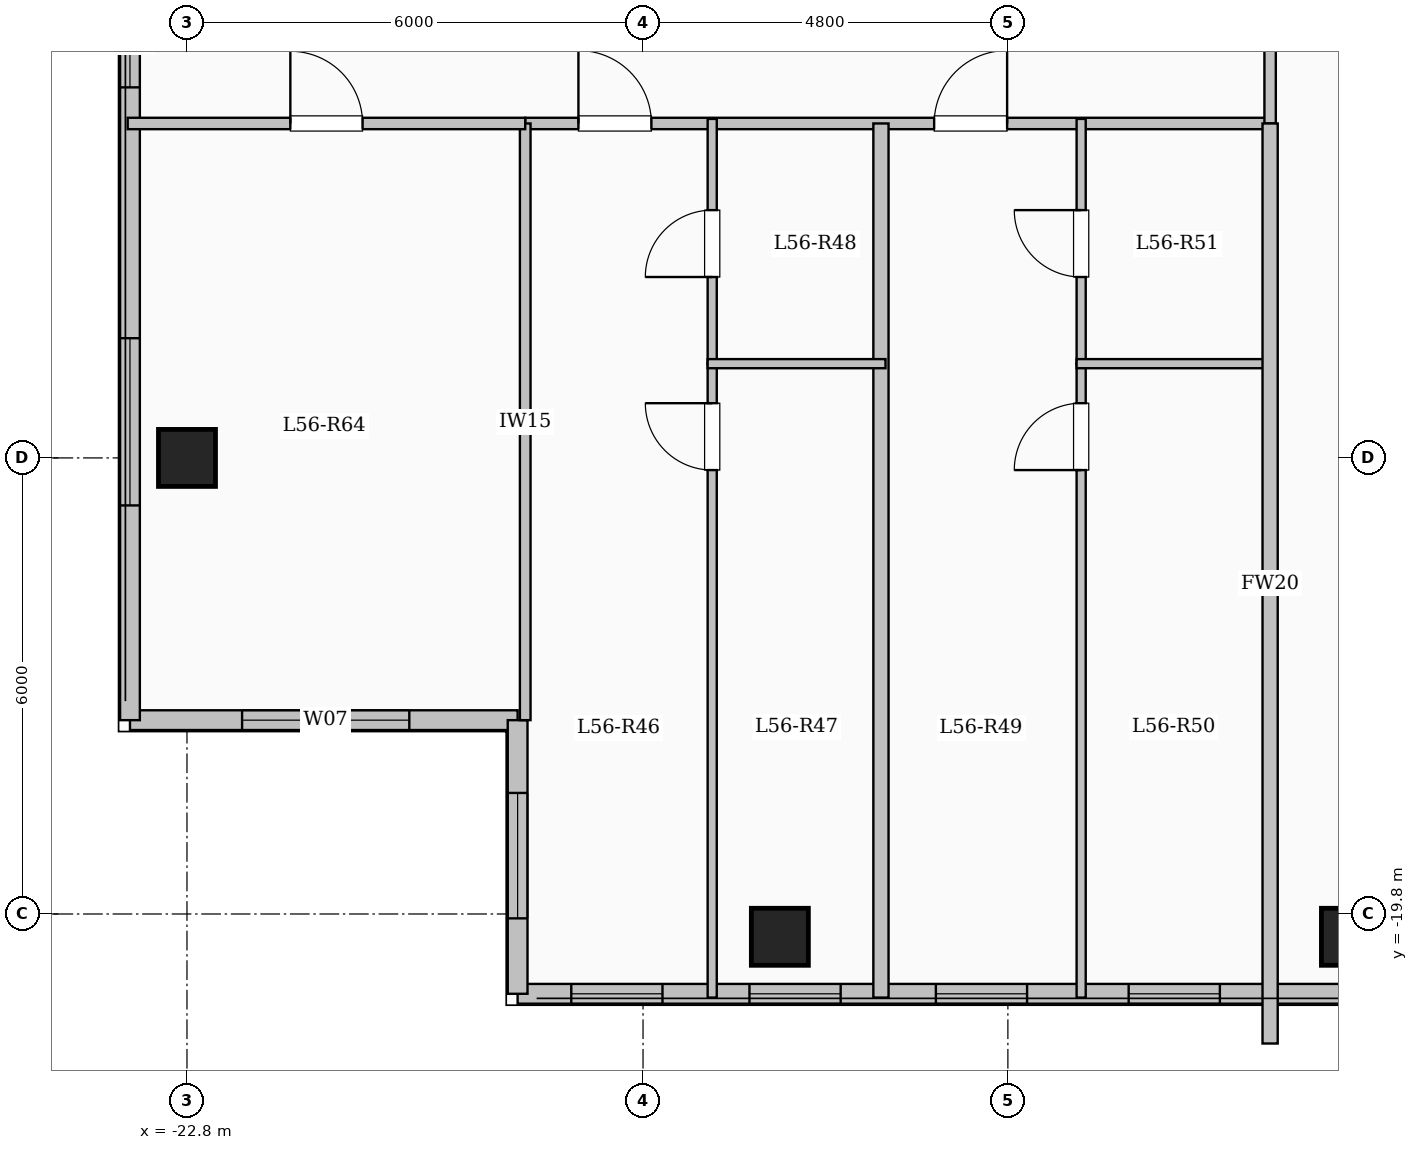
"""IFC4 building model, lengths in metres.
Left out: names, types, materials, properties, quantities, classifications, styles, units other than length and angle.
Written with IfcOpenShell. Run it as: python <this file> out.ifc"""

import sys

from ifc_helpers import new_model, si_unit, direction, frame, frame_2d, origin, origin_2d, place, context, subcontext, project, spatial, rectangle, extrude, element, fill, save


model = new_model("IFC4")
c1 = context("Model", 3, precision=1e-05, world=origin(), true_north=direction((0.0, 1.0)))
c2 = subcontext(c1, "Body", "Model", "MODEL_VIEW")
j1 = project(units=[si_unit("LENGTHUNIT", "METRE"), si_unit("PLANEANGLEUNIT", "RADIAN")], contexts=[c1])
p1 = place(None, origin())
s1 = spatial("IfcSite", under=j1, at=p1, CompositionType="ELEMENT")
p2 = place(p1, origin())
s2 = spatial("IfcBuilding", under=s1, at=p2, CompositionType="ELEMENT")
p3 = place(p2, frame((0.0, 0.0, 207.0)))
s3 = spatial("IfcBuildingStorey", under=s2, at=p3, CompositionType="ELEMENT", Elevation=207.0)
for number, where, z_axis, x_axis in (
    (1, (-15.0, -20.1, 0.0), (0.0, 0.0, 1.0), (1.0, 0.0, 0.0)),
    (2, (-7.5, -20.1, 0.0), (0.0, 0.0, 1.0), (1.0, 0.0, 0.0)),
    (3, (-22.8, -13.8, 0.0), (0.0, 0.0, 1.0), (1.0, 0.0, 0.0)),
):
    element("IfcColumn", number, at=place(p3, frame(where, z_axis=z_axis, x_axis=x_axis)), inside=s3, PredefinedType="COLUMN", context=c2, shape_type="SweptSolid", body=[
        extrude(rectangle(XDim=0.75, YDim=0.75, at=origin_2d()), origin(), (0.0, 0.0, 1.0), 3.35),
    ])
p4 = place(p3, frame((-18.45, -17.25, 0.0), z_axis=(0.0, 0.0, 1.0), x_axis=(-1.0, 0.0, 0.0)))
e4 = element("IfcWall", 4, at=p4, inside=s3, PredefinedType="SOLIDWALL", context=c2, shape_type="SweptSolid", body=[
    extrude(rectangle(XDim=5.1, YDim=0.26, at=frame_2d((2.55, 0.0))), origin(), (0.0, 0.0, 1.0), 3.1),
])
p5 = place(p4, frame((1.425, 0.0, 0.9)))
e5 = element("IfcOpeningElement", 5, at=p5, cuts=e4, PredefinedType="OPENING", context=c2, shape_type="SweptSolid", body=[
    extrude(rectangle(XDim=2.2, YDim=1.75, at=frame_2d((1.1, 0.875))), frame((0.0, 0.14, 0.0), z_axis=(0.0, -1.0, 0.0), x_axis=(1.0, 0.0, 0.0)), (0.0, 0.0, 1.0), 0.28),
])
p6 = place(p3, frame((-23.55, -17.25, 0.0), z_axis=(0.0, 0.0, 1.0), x_axis=(0.0, 1.0, 0.0)))
e6 = element("IfcWall", 6, at=p6, inside=s3, PredefinedType="SOLIDWALL", context=c2, shape_type="SweptSolid", body=[
    extrude(rectangle(XDim=34.5, YDim=0.26, at=frame_2d((17.25, 0.0))), origin(), (0.0, 0.0, 1.0), 3.1),
])
p7 = place(p6, frame((2.825, 0.0, 0.9)))
e7 = element("IfcOpeningElement", 7, at=p7, cuts=e6, PredefinedType="OPENING", context=c2, shape_type="SweptSolid", body=[
    extrude(rectangle(XDim=2.2, YDim=1.75, at=frame_2d((1.1, 0.875))), frame((0.0, 0.14, 0.0), z_axis=(0.0, -1.0, 0.0), x_axis=(1.0, 0.0, 0.0)), (0.0, 0.0, 1.0), 0.28),
])
p8 = place(p6, frame((8.325, 0.0, 0.95)))
e8 = element("IfcOpeningElement", 8, at=p8, cuts=e6, PredefinedType="OPENING", context=c2, shape_type="SweptSolid", body=[
    extrude(rectangle(XDim=1.2, YDim=1.5, at=frame_2d((0.6, 0.75))), frame((0.0, 0.14, 0.0), z_axis=(0.0, -1.0, 0.0), x_axis=(1.0, 0.0, 0.0)), (0.0, 0.0, 1.0), 0.28),
])
p9 = place(p6, frame((13.25, 0.0, 0.9)))
e9 = element("IfcOpeningElement", 9, at=p9, cuts=e6, PredefinedType="OPENING", context=c2, shape_type="SweptSolid", body=[
    extrude(rectangle(XDim=2.2, YDim=1.75, at=frame_2d((1.1, 0.875))), frame((0.0, 0.14, 0.0), z_axis=(0.0, -1.0, 0.0), x_axis=(1.0, 0.0, 0.0)), (0.0, 0.0, 1.0), 0.28),
])
p10 = place(p6, frame((19.65, 0.0, 0.9)))
e10 = element("IfcOpeningElement", 10, at=p10, cuts=e6, PredefinedType="OPENING", context=c2, shape_type="SweptSolid", body=[
    extrude(rectangle(XDim=1.65, YDim=1.6, at=frame_2d((0.825, 0.8))), frame((0.0, 0.14, 0.0), z_axis=(0.0, -1.0, 0.0), x_axis=(1.0, 0.0, 0.0)), (0.0, 0.0, 1.0), 0.28),
])
p11 = place(p6, frame((24.125, 0.0, 0.9)))
e11 = element("IfcOpeningElement", 11, at=p11, cuts=e6, PredefinedType="OPENING", context=c2, shape_type="SweptSolid", body=[
    extrude(rectangle(XDim=2.0, YDim=1.7, at=frame_2d((1.0, 0.85))), frame((0.0, 0.14, 0.0), z_axis=(0.0, -1.0, 0.0), x_axis=(1.0, 0.0, 0.0)), (0.0, 0.0, 1.0), 0.28),
])
p12 = place(p6, frame((28.375, 0.0, 0.95)))
e12 = element("IfcOpeningElement", 12, at=p12, cuts=e6, PredefinedType="OPENING", context=c2, shape_type="SweptSolid", body=[
    extrude(rectangle(XDim=1.0, YDim=1.5, at=frame_2d((0.5, 0.75))), frame((0.0, 0.14, 0.0), z_axis=(0.0, -1.0, 0.0), x_axis=(1.0, 0.0, 0.0)), (0.0, 0.0, 1.0), 0.28),
])
p13 = place(p6, frame((31.125, 0.0, 0.9)))
e13 = element("IfcOpeningElement", 13, at=p13, cuts=e6, PredefinedType="OPENING", context=c2, shape_type="SweptSolid", body=[
    extrude(rectangle(XDim=2.0, YDim=1.7, at=frame_2d((1.0, 0.85))), frame((0.0, 0.14, 0.0), z_axis=(0.0, -1.0, 0.0), x_axis=(1.0, 0.0, 0.0)), (0.0, 0.0, 1.0), 0.28),
])
p14 = place(p3, frame((-7.35, -20.85, 0.0), z_axis=(0.0, 0.0, 1.0), x_axis=(-1.0, 0.0, 0.0)))
e14 = element("IfcWall", 14, at=p14, inside=s3, PredefinedType="SOLIDWALL", context=c2, shape_type="SweptSolid", body=[
    extrude(rectangle(XDim=11.1, YDim=0.26, at=frame_2d((5.55, 0.0))), origin(), (0.0, 0.0, 1.0), 3.1),
])
p15 = place(p14, frame((1.861, 0.0, 0.95)))
e15 = element("IfcOpeningElement", 15, at=p15, cuts=e14, PredefinedType="OPENING", context=c2, shape_type="SweptSolid", body=[
    extrude(rectangle(XDim=1.2, YDim=1.5, at=frame_2d((0.6, 0.75))), frame((0.0, 0.14, 0.0), z_axis=(0.0, -1.0, 0.0), x_axis=(1.0, 0.0, 0.0)), (0.0, 0.0, 1.0), 0.28),
])
p16 = place(p14, frame((4.397, 0.0, 0.95)))
e16 = element("IfcOpeningElement", 16, at=p16, cuts=e14, PredefinedType="OPENING", context=c2, shape_type="SweptSolid", body=[
    extrude(rectangle(XDim=1.2, YDim=1.5, at=frame_2d((0.6, 0.75))), frame((0.0, 0.14, 0.0), z_axis=(0.0, -1.0, 0.0), x_axis=(1.0, 0.0, 0.0)), (0.0, 0.0, 1.0), 0.28),
])
p17 = place(p14, frame((6.85, 0.0, 0.95)))
e17 = element("IfcOpeningElement", 17, at=p17, cuts=e14, PredefinedType="OPENING", context=c2, shape_type="SweptSolid", body=[
    extrude(rectangle(XDim=1.2, YDim=1.5, at=frame_2d((0.6, 0.75))), frame((0.0, 0.14, 0.0), z_axis=(0.0, -1.0, 0.0), x_axis=(1.0, 0.0, 0.0)), (0.0, 0.0, 1.0), 0.28),
])
p18 = place(p14, frame((9.194, 0.0, 0.95)))
e18 = element("IfcOpeningElement", 18, at=p18, cuts=e14, PredefinedType="OPENING", context=c2, shape_type="SweptSolid", body=[
    extrude(rectangle(XDim=1.2, YDim=1.5, at=frame_2d((0.6, 0.75))), frame((0.0, 0.14, 0.0), z_axis=(0.0, -1.0, 0.0), x_axis=(1.0, 0.0, 0.0)), (0.0, 0.0, 1.0), 0.28),
])
p19 = place(p3, frame((-18.45, -20.85, 0.0), z_axis=(0.0, 0.0, 1.0), x_axis=(0.0, 1.0, 0.0)))
e19 = element("IfcWall", 19, at=p19, inside=s3, PredefinedType="SOLIDWALL", context=c2, shape_type="SweptSolid", body=[
    extrude(rectangle(XDim=3.6, YDim=0.26, at=frame_2d((1.8, 0.0))), origin(), (0.0, 0.0, 1.0), 3.1),
])
p20 = place(p19, frame((0.992, 0.0, 0.9)))
e20 = element("IfcOpeningElement", 20, at=p20, cuts=e19, PredefinedType="OPENING", context=c2, shape_type="SweptSolid", body=[
    extrude(rectangle(XDim=1.65, YDim=1.6, at=frame_2d((0.825, 0.8))), frame((0.0, 0.14, 0.0), z_axis=(0.0, -1.0, 0.0), x_axis=(1.0, 0.0, 0.0)), (0.0, 0.0, 1.0), 0.28),
])
p21 = place(p3, frame((-18.35, -9.4, 0.0), z_axis=(0.0, 0.0, 1.0), x_axis=(1.0, 0.0, 0.0)))
e21 = element("IfcWall", 21, at=p21, inside=s3, PredefinedType="PARTITIONING", context=c2, shape_type="SweptSolid", body=[
    extrude(rectangle(XDim=9.8, YDim=0.15, at=frame_2d((4.9, 0.0))), origin(), (0.0, 0.0, 1.0), 3.1),
])
p22 = place(p21, frame((0.7, 0.0, 0.0)))
e22 = element("IfcOpeningElement", 22, at=p22, cuts=e21, PredefinedType="OPENING", context=c2, shape_type="SweptSolid", body=[
    extrude(rectangle(XDim=0.96, YDim=2.15, at=frame_2d((0.48, 1.075))), frame((0.0, 0.085, 0.0), z_axis=(0.0, -1.0, 0.0), x_axis=(1.0, 0.0, 0.0)), (0.0, 0.0, 1.0), 0.17),
])
p23 = place(p21, frame((5.38, 0.0, 0.0)))
e23 = element("IfcOpeningElement", 23, at=p23, cuts=e21, PredefinedType="OPENING", context=c2, shape_type="SweptSolid", body=[
    extrude(rectangle(XDim=0.96, YDim=2.15, at=frame_2d((0.48, 1.075))), frame((0.0, 0.085, 0.0), z_axis=(0.0, -1.0, 0.0), x_axis=(1.0, 0.0, 0.0)), (0.0, 0.0, 1.0), 0.17),
])
p24 = place(p3, frame((-8.55, -9.4, 0.0), z_axis=(0.0, 0.0, 1.0), x_axis=(0.0, 1.0, 0.0)))
e24 = element("IfcWall", 24, at=p24, inside=s3, PredefinedType="PARTITIONING", context=c2, shape_type="SweptSolid", body=[
    extrude(rectangle(XDim=2.15, YDim=0.15, at=frame_2d((1.075, 0.0))), origin(), (0.0, 0.0, 1.0), 3.1),
])
p25 = place(p3, frame((-13.67, -20.9, 0.0), z_axis=(0.0, 0.0, 1.0), x_axis=(0.0, 1.0, 0.0)))
e25 = element("IfcWall", 25, at=p25, inside=s3, PredefinedType="SOLIDWALL", context=c2, shape_type="SweptSolid", body=[
    extrude(rectangle(XDim=11.5, YDim=0.2, at=frame_2d((5.75, 0.0))), origin(), (0.0, 0.0, 1.0), 3.1),
])
p26 = place(p3, frame((-15.89, -20.9, 0.0), z_axis=(0.0, 0.0, 1.0), x_axis=(0.0, 1.0, 0.0)))
e26 = element("IfcWall", 26, at=p26, inside=s3, PredefinedType="PARTITIONING", context=c2, shape_type="SweptSolid", body=[
    extrude(rectangle(XDim=8.34, YDim=0.12, at=frame_2d((4.17, 0.0))), origin(), (0.0, 0.0, 1.0), 3.1),
])
p27 = place(p26, frame((6.94, 0.0, 0.0)))
e27 = element("IfcOpeningElement", 27, at=p27, cuts=e26, PredefinedType="OPENING", context=c2, shape_type="SweptSolid", body=[
    extrude(rectangle(XDim=0.88, YDim=2.1, at=frame_2d((0.44, 1.05))), frame((0.0, 0.07, 0.0), z_axis=(0.0, -1.0, 0.0), x_axis=(1.0, 0.0, 0.0)), (0.0, 0.0, 1.0), 0.14),
])
p28 = place(p3, frame((-15.89, -12.56, 0.0), z_axis=(0.0, 0.0, 1.0), x_axis=(0.0, 1.0, 0.0)))
e28 = element("IfcWall", 28, at=p28, inside=s3, PredefinedType="PARTITIONING", context=c2, shape_type="SweptSolid", body=[
    extrude(rectangle(XDim=3.22, YDim=0.12, at=frame_2d((1.61, 0.0))), origin(), (0.0, 0.0, 1.0), 3.1),
])
p29 = place(p28, frame((1.14, 0.0, 0.0)))
e29 = element("IfcOpeningElement", 29, at=p29, cuts=e28, PredefinedType="OPENING", context=c2, shape_type="SweptSolid", body=[
    extrude(rectangle(XDim=0.88, YDim=2.1, at=frame_2d((0.44, 1.05))), frame((0.0, 0.07, 0.0), z_axis=(0.0, -1.0, 0.0), x_axis=(1.0, 0.0, 0.0)), (0.0, 0.0, 1.0), 0.14),
])
p30 = place(p3, frame((-15.95, -12.56, 0.0), z_axis=(0.0, 0.0, 1.0), x_axis=(1.0, 0.0, 0.0)))
e30 = element("IfcWall", 30, at=p30, inside=s3, PredefinedType="PARTITIONING", context=c2, shape_type="SweptSolid", body=[
    extrude(rectangle(XDim=2.34, YDim=0.12, at=frame_2d((1.17, 0.0))), origin(), (0.0, 0.0, 1.0), 2.725),
])
p31 = place(p3, frame((-11.036, -20.9, 0.0), z_axis=(0.0, 0.0, 1.0), x_axis=(0.0, 1.0, 0.0)))
e31 = element("IfcWall", 31, at=p31, inside=s3, PredefinedType="PARTITIONING", context=c2, shape_type="SweptSolid", body=[
    extrude(rectangle(XDim=8.34, YDim=0.12, at=frame_2d((4.17, 0.0))), origin(), (0.0, 0.0, 1.0), 3.1),
])
p32 = place(p31, frame((6.94, 0.0, 0.0)))
e32 = element("IfcOpeningElement", 32, at=p32, cuts=e31, PredefinedType="OPENING", context=c2, shape_type="SweptSolid", body=[
    extrude(rectangle(XDim=0.88, YDim=2.1, at=frame_2d((0.44, 1.05))), frame((0.0, 0.07, 0.0), z_axis=(0.0, -1.0, 0.0), x_axis=(1.0, 0.0, 0.0)), (0.0, 0.0, 1.0), 0.14),
])
p33 = place(p3, frame((-11.036, -12.56, 0.0), z_axis=(0.0, 0.0, 1.0), x_axis=(0.0, 1.0, 0.0)))
e33 = element("IfcWall", 33, at=p33, inside=s3, PredefinedType="PARTITIONING", context=c2, shape_type="SweptSolid", body=[
    extrude(rectangle(XDim=3.22, YDim=0.12, at=frame_2d((1.61, 0.0))), origin(), (0.0, 0.0, 1.0), 3.1),
])
p34 = place(p33, frame((1.14, 0.0, 0.0)))
e34 = element("IfcOpeningElement", 34, at=p34, cuts=e33, PredefinedType="OPENING", context=c2, shape_type="SweptSolid", body=[
    extrude(rectangle(XDim=0.88, YDim=2.1, at=frame_2d((0.44, 1.05))), frame((0.0, 0.07, 0.0), z_axis=(0.0, -1.0, 0.0), x_axis=(1.0, 0.0, 0.0)), (0.0, 0.0, 1.0), 0.14),
])
p35 = place(p3, frame((-11.096, -12.56, 0.0), z_axis=(0.0, 0.0, 1.0), x_axis=(1.0, 0.0, 0.0)))
e35 = element("IfcWall", 35, at=p35, inside=s3, PredefinedType="PARTITIONING", context=c2, shape_type="SweptSolid", body=[
    extrude(rectangle(XDim=2.556, YDim=0.12, at=frame_2d((1.278, 0.0))), origin(), (0.0, 0.0, 1.0), 2.725),
])
p36 = place(p3, frame((-8.55, -21.504, 0.0), z_axis=(0.0, 0.0, 1.0), x_axis=(0.0, 1.0, 0.0)))
e36 = element("IfcWall", 36, at=p36, inside=s3, PredefinedType="SOLIDWALL", context=c2, shape_type="SweptSolid", body=[
    extrude(rectangle(XDim=12.104, YDim=0.2, at=frame_2d((6.052, 0.0))), origin(), (0.0, 0.0, 1.0), 3.1),
])
p37 = place(p3, frame((-18.35, -17.25, 0.0), z_axis=(0.0, 0.0, 1.0), x_axis=(0.0, 1.0, 0.0)))
e37 = element("IfcWall", 37, at=p37, inside=s3, PredefinedType="PARTITIONING", context=c2, shape_type="SweptSolid", body=[
    extrude(rectangle(XDim=7.85, YDim=0.14, at=frame_2d((3.925, 0.0))), origin(), (0.0, 0.0, 1.0), 3.1),
])
p38 = place(p3, frame((-23.58, -9.4, 0.0), z_axis=(0.0, 0.0, 1.0), x_axis=(1.0, 0.0, 0.0)))
e38 = element("IfcWall", 38, at=p38, inside=s3, PredefinedType="PARTITIONING", context=c2, shape_type="SweptSolid", body=[
    extrude(rectangle(XDim=5.23, YDim=0.15, at=frame_2d((2.615, 0.0))), origin(), (0.0, 0.0, 1.0), 3.1),
])
p39 = place(p38, frame((2.14, 0.0, 0.0)))
e39 = element("IfcOpeningElement", 39, at=p39, cuts=e38, PredefinedType="OPENING", context=c2, shape_type="SweptSolid", body=[
    extrude(rectangle(XDim=0.95, YDim=2.15, at=frame_2d((0.475, 1.075))), frame((0.0, 0.085, 0.0), z_axis=(0.0, -1.0, 0.0), x_axis=(1.0, 0.0, 0.0)), (0.0, 0.0, 1.0), 0.17),
])
p40 = place(p5, origin())
e40 = element("IfcWindow", 40, at=p40, inside=s3, PartitioningType="SINGLE_PANEL", PredefinedType="WINDOW", context=c2, shape_type="SweptSolid", body=[
    extrude(rectangle(XDim=2.2, YDim=1.75, at=frame_2d((1.1, 0.875))), frame((0.0, 0.03, 0.0), z_axis=(0.0, -1.0, 0.0), x_axis=(1.0, 0.0, 0.0)), (0.0, 0.0, 1.0), 0.06),
])
fill(e5, e40)
p41 = place(p7, origin())
e41 = element("IfcWindow", 41, at=p41, inside=s3, PartitioningType="SINGLE_PANEL", PredefinedType="WINDOW", context=c2, shape_type="SweptSolid", body=[
    extrude(rectangle(XDim=2.2, YDim=1.75, at=frame_2d((1.1, 0.875))), frame((0.0, 0.03, 0.0), z_axis=(0.0, -1.0, 0.0), x_axis=(1.0, 0.0, 0.0)), (0.0, 0.0, 1.0), 0.06),
])
fill(e7, e41)
p42 = place(p8, origin())
e42 = element("IfcWindow", 42, at=p42, inside=s3, PartitioningType="SINGLE_PANEL", PredefinedType="WINDOW", context=c2, shape_type="SweptSolid", body=[
    extrude(rectangle(XDim=1.2, YDim=1.5, at=frame_2d((0.6, 0.75))), frame((0.0, 0.03, 0.0), z_axis=(0.0, -1.0, 0.0), x_axis=(1.0, 0.0, 0.0)), (0.0, 0.0, 1.0), 0.06),
])
fill(e8, e42)
p43 = place(p15, origin())
e43 = element("IfcWindow", 43, at=p43, inside=s3, PartitioningType="SINGLE_PANEL", PredefinedType="WINDOW", context=c2, shape_type="SweptSolid", body=[
    extrude(rectangle(XDim=1.2, YDim=1.5, at=frame_2d((0.6, 0.75))), frame((0.0, 0.03, 0.0), z_axis=(0.0, -1.0, 0.0), x_axis=(1.0, 0.0, 0.0)), (0.0, 0.0, 1.0), 0.06),
])
fill(e15, e43)
p44 = place(p16, origin())
e44 = element("IfcWindow", 44, at=p44, inside=s3, PartitioningType="SINGLE_PANEL", PredefinedType="WINDOW", context=c2, shape_type="SweptSolid", body=[
    extrude(rectangle(XDim=1.2, YDim=1.5, at=frame_2d((0.6, 0.75))), frame((0.0, 0.03, 0.0), z_axis=(0.0, -1.0, 0.0), x_axis=(1.0, 0.0, 0.0)), (0.0, 0.0, 1.0), 0.06),
])
fill(e16, e44)
p45 = place(p17, origin())
e45 = element("IfcWindow", 45, at=p45, inside=s3, PartitioningType="SINGLE_PANEL", PredefinedType="WINDOW", context=c2, shape_type="SweptSolid", body=[
    extrude(rectangle(XDim=1.2, YDim=1.5, at=frame_2d((0.6, 0.75))), frame((0.0, 0.03, 0.0), z_axis=(0.0, -1.0, 0.0), x_axis=(1.0, 0.0, 0.0)), (0.0, 0.0, 1.0), 0.06),
])
fill(e17, e45)
p46 = place(p18, origin())
e46 = element("IfcWindow", 46, at=p46, inside=s3, PartitioningType="SINGLE_PANEL", PredefinedType="WINDOW", context=c2, shape_type="SweptSolid", body=[
    extrude(rectangle(XDim=1.2, YDim=1.5, at=frame_2d((0.6, 0.75))), frame((0.0, 0.03, 0.0), z_axis=(0.0, -1.0, 0.0), x_axis=(1.0, 0.0, 0.0)), (0.0, 0.0, 1.0), 0.06),
])
fill(e18, e46)
p47 = place(p20, origin())
e47 = element("IfcWindow", 47, at=p47, inside=s3, PartitioningType="SINGLE_PANEL", PredefinedType="WINDOW", context=c2, shape_type="SweptSolid", body=[
    extrude(rectangle(XDim=1.65, YDim=1.6, at=frame_2d((0.825, 0.8))), frame((0.0, 0.03, 0.0), z_axis=(0.0, -1.0, 0.0), x_axis=(1.0, 0.0, 0.0)), (0.0, 0.0, 1.0), 0.06),
])
fill(e20, e47)
p48 = place(p22, origin())
e48 = element("IfcDoor", 48, at=p48, inside=s3, OperationType="SINGLE_SWING_LEFT", PredefinedType="DOOR", context=c2, shape_type="SweptSolid", body=[
    extrude(rectangle(XDim=0.96, YDim=2.15, at=frame_2d((0.48, 1.075))), frame((0.0, 0.025, 0.0), z_axis=(0.0, -1.0, 0.0), x_axis=(1.0, 0.0, 0.0)), (0.0, 0.0, 1.0), 0.05),
])
fill(e22, e48)
p49 = place(p27, origin())
e49 = element("IfcDoor", 49, at=p49, inside=s3, OperationType="SINGLE_SWING_RIGHT", PredefinedType="DOOR", context=c2, shape_type="SweptSolid", body=[
    extrude(rectangle(XDim=0.88, YDim=2.1, at=frame_2d((0.44, 1.05))), frame((0.0, 0.025, 0.0), z_axis=(0.0, -1.0, 0.0), x_axis=(1.0, 0.0, 0.0)), (0.0, 0.0, 1.0), 0.05),
])
fill(e27, e49)
p50 = place(p29, origin())
e50 = element("IfcDoor", 50, at=p50, inside=s3, OperationType="SINGLE_SWING_LEFT", PredefinedType="DOOR", context=c2, shape_type="SweptSolid", body=[
    extrude(rectangle(XDim=0.88, YDim=2.1, at=frame_2d((0.44, 1.05))), frame((0.0, 0.025, 0.0), z_axis=(0.0, -1.0, 0.0), x_axis=(1.0, 0.0, 0.0)), (0.0, 0.0, 1.0), 0.05),
])
fill(e29, e50)
p51 = place(p23, origin())
e51 = element("IfcDoor", 51, at=p51, inside=s3, OperationType="SINGLE_SWING_RIGHT", PredefinedType="DOOR", context=c2, shape_type="SweptSolid", body=[
    extrude(rectangle(XDim=0.96, YDim=2.15, at=frame_2d((0.48, 1.075))), frame((0.0, 0.025, 0.0), z_axis=(0.0, -1.0, 0.0), x_axis=(1.0, 0.0, 0.0)), (0.0, 0.0, 1.0), 0.05),
])
fill(e23, e51)
p52 = place(p32, origin())
e52 = element("IfcDoor", 52, at=p52, inside=s3, OperationType="SINGLE_SWING_LEFT", PredefinedType="DOOR", context=c2, shape_type="SweptSolid", body=[
    extrude(rectangle(XDim=0.88, YDim=2.1, at=frame_2d((0.44, 1.05))), frame((0.0, 0.025, 0.0), z_axis=(0.0, -1.0, 0.0), x_axis=(1.0, 0.0, 0.0)), (0.0, 0.0, 1.0), 0.05),
])
fill(e32, e52)
p53 = place(p34, origin())
e53 = element("IfcDoor", 53, at=p53, inside=s3, OperationType="SINGLE_SWING_RIGHT", PredefinedType="DOOR", context=c2, shape_type="SweptSolid", body=[
    extrude(rectangle(XDim=0.88, YDim=2.1, at=frame_2d((0.44, 1.05))), frame((0.0, 0.025, 0.0), z_axis=(0.0, -1.0, 0.0), x_axis=(1.0, 0.0, 0.0)), (0.0, 0.0, 1.0), 0.05),
])
fill(e34, e53)
p54 = place(p39, origin())
e54 = element("IfcDoor", 54, at=p54, inside=s3, OperationType="SINGLE_SWING_LEFT", PredefinedType="DOOR", context=c2, shape_type="SweptSolid", body=[
    extrude(rectangle(XDim=0.95, YDim=2.15, at=frame_2d((0.475, 1.075))), frame((0.0, 0.025, 0.0), z_axis=(0.0, -1.0, 0.0), x_axis=(1.0, 0.0, 0.0)), (0.0, 0.0, 1.0), 0.05),
])
fill(e39, e54)
save(model, sys.argv[1])
